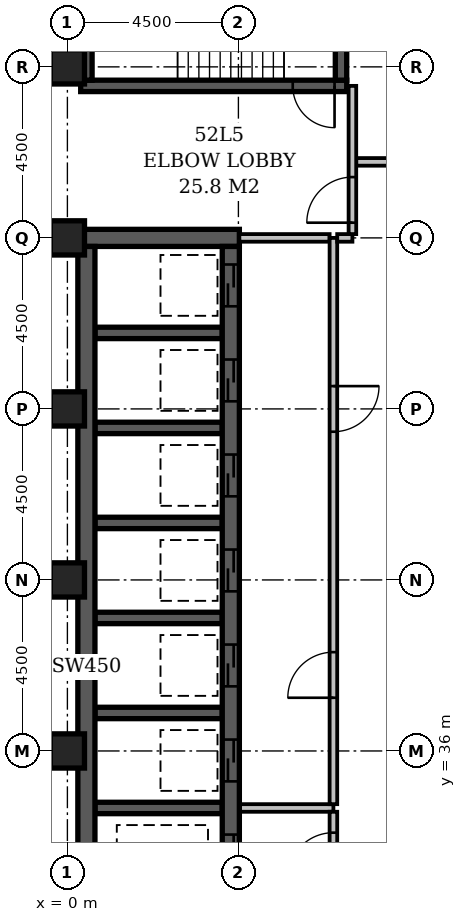
"""IFC4 building model, lengths in metres.
Left out: names, types, materials, properties, quantities, classifications, styles, units other than length and angle.
Written with IfcOpenShell. Run it as: python <this file> out.ifc"""

import sys

from ifc_helpers import new_model, si_unit, direction, frame, frame_2d, origin, origin_2d, place, context, subcontext, project, spatial, rectangle, extrude, element, fill, save


model = new_model("IFC4")
c1 = context("Model", 3, precision=1e-05, world=origin(), true_north=direction((0.0, 1.0)))
c2 = subcontext(c1, "Body", "Model", "MODEL_VIEW")
j1 = project(units=[si_unit("LENGTHUNIT", "METRE"), si_unit("PLANEANGLEUNIT", "RADIAN")], contexts=[c1])
p1 = place(None, origin())
s1 = spatial("IfcSite", under=j1, at=p1, CompositionType="ELEMENT")
p2 = place(p1, origin())
s2 = spatial("IfcBuilding", under=s1, at=p2, CompositionType="ELEMENT")
p3 = place(p2, frame((0.0, 0.0, 204.2)))
s3 = spatial("IfcBuildingStorey", under=s2, at=p3, CompositionType="ELEMENT", Elevation=204.2)
p4 = place(p3, frame((0.275, 49.5, -0.3), z_axis=(0.0, 0.0, 1.0), x_axis=(1.0, 0.0, 0.0)))
e1 = element("IfcWall", 1, at=p4, inside=s3, PredefinedType="SHEAR", context=c2, shape_type="SweptSolid", body=[
    extrude(rectangle(XDim=4.25, YDim=0.45, at=frame_2d((2.125, 0.0))), origin(), (0.0, 0.0, 1.0), 3.6),
])
p5 = place(p3, frame((0.35, 53.5, -0.3), z_axis=(0.0, 0.0, 1.0), x_axis=(1.0, 0.0, 0.0)))
e2 = element("IfcWall", 2, at=p5, inside=s3, PredefinedType="SHEAR", context=c2, shape_type="SweptSolid", body=[
    extrude(rectangle(XDim=7.0, YDim=0.3, at=frame_2d((3.5, 0.0))), origin(), (0.0, 0.0, 1.0), 3.6),
])
p6 = place(p5, frame((5.58, 0.0, 0.3)))
e3 = element("IfcOpeningElement", 3, at=p6, cuts=e2, PredefinedType="OPENING", context=c2, shape_type="SweptSolid", body=[
    extrude(rectangle(XDim=1.1, YDim=2.1, at=frame_2d((0.55, 1.05))), frame((0.0, 0.162, 0.0), z_axis=(0.0, -1.0, 0.0), x_axis=(1.0, 0.0, 0.0)), (0.0, 0.0, 1.0), 0.324),
])
p7 = place(p3, frame((0.5, 27.15, -0.3), z_axis=(0.0, 0.0, 1.0), x_axis=(0.0, 1.0, 0.0)))
e4 = element("IfcWall", 4, at=p7, inside=s3, PredefinedType="SHEAR", context=c2, shape_type="SweptSolid", body=[
    extrude(rectangle(XDim=22.125, YDim=0.45, at=frame_2d((11.062, 0.0))), origin(), (0.0, 0.0, 1.0), 3.6),
])
p8 = place(p3, frame((0.5, 53.65, -0.3), z_axis=(0.0, 0.0, 1.0), x_axis=(0.0, 1.0, 0.0)))
e5 = element("IfcWall", 5, at=p8, inside=s3, PredefinedType="SHEAR", context=c2, shape_type="SweptSolid", body=[
    extrude(rectangle(XDim=4.2, YDim=0.3, at=frame_2d((2.1, 0.0))), origin(), (0.0, 0.0, 1.0), 3.6),
])
for number, where, z_axis, x_axis in (
    (6, (0.725, 34.5, -0.3), (0.0, 0.0, 1.0), (1.0, 0.0, 0.0)),
    (7, (0.725, 37.0, -0.3), (0.0, 0.0, 1.0), (1.0, 0.0, 0.0)),
    (8, (0.725, 39.5, -0.3), (0.0, 0.0, 1.0), (1.0, 0.0, 0.0)),
    (9, (0.725, 42.0, -0.3), (0.0, 0.0, 1.0), (1.0, 0.0, 0.0)),
    (10, (0.725, 44.5, -0.3), (0.0, 0.0, 1.0), (1.0, 0.0, 0.0)),
    (11, (0.725, 47.0, -0.3), (0.0, 0.0, 1.0), (1.0, 0.0, 0.0)),
):
    element("IfcWall", number, at=place(p3, frame(where, z_axis=z_axis, x_axis=x_axis)), inside=s3, PredefinedType="SHEAR", context=c2, shape_type="SweptSolid", body=[
        extrude(rectangle(XDim=3.35, YDim=0.3, at=frame_2d((1.675, 0.0))), origin(), (0.0, 0.0, 1.0), 3.6),
    ])
p9 = place(p3, frame((4.3, 27.15, -0.3), z_axis=(0.0, 0.0, 1.0), x_axis=(0.0, 1.0, 0.0)))
e12 = element("IfcWall", 12, at=p9, inside=s3, PredefinedType="SHEAR", context=c2, shape_type="SweptSolid", body=[
    extrude(rectangle(XDim=22.125, YDim=0.45, at=frame_2d((11.062, 0.0))), origin(), (0.0, 0.0, 1.0), 3.6),
])
p10 = place(p9, frame((3.05, 0.0, 0.3)))
e13 = element("IfcOpeningElement", 13, at=p10, cuts=e12, PredefinedType="OPENING", context=c2, shape_type="SweptSolid", body=[
    extrude(rectangle(XDim=1.1, YDim=2.1, at=frame_2d((0.55, 1.05))), frame((0.0, 0.237, 0.0), z_axis=(0.0, -1.0, 0.0), x_axis=(1.0, 0.0, 0.0)), (0.0, 0.0, 1.0), 0.474),
])
p11 = place(p9, frame((0.55, 0.0, 0.3)))
e14 = element("IfcOpeningElement", 14, at=p11, cuts=e12, PredefinedType="OPENING", context=c2, shape_type="SweptSolid", body=[
    extrude(rectangle(XDim=1.1, YDim=2.1, at=frame_2d((0.55, 1.05))), frame((0.0, 0.237, 0.0), z_axis=(0.0, -1.0, 0.0), x_axis=(1.0, 0.0, 0.0)), (0.0, 0.0, 1.0), 0.474),
])
p12 = place(p9, frame((20.55, 0.0, 0.3)))
e15 = element("IfcOpeningElement", 15, at=p12, cuts=e12, PredefinedType="OPENING", context=c2, shape_type="SweptSolid", body=[
    extrude(rectangle(XDim=1.1, YDim=2.1, at=frame_2d((0.55, 1.05))), frame((0.0, 0.237, 0.0), z_axis=(0.0, -1.0, 0.0), x_axis=(1.0, 0.0, 0.0)), (0.0, 0.0, 1.0), 0.474),
])
p13 = place(p9, frame((18.05, 0.0, 0.3)))
e16 = element("IfcOpeningElement", 16, at=p13, cuts=e12, PredefinedType="OPENING", context=c2, shape_type="SweptSolid", body=[
    extrude(rectangle(XDim=1.1, YDim=2.1, at=frame_2d((0.55, 1.05))), frame((0.0, 0.237, 0.0), z_axis=(0.0, -1.0, 0.0), x_axis=(1.0, 0.0, 0.0)), (0.0, 0.0, 1.0), 0.474),
])
p14 = place(p9, frame((15.55, 0.0, 0.3)))
e17 = element("IfcOpeningElement", 17, at=p14, cuts=e12, PredefinedType="OPENING", context=c2, shape_type="SweptSolid", body=[
    extrude(rectangle(XDim=1.1, YDim=2.1, at=frame_2d((0.55, 1.05))), frame((0.0, 0.237, 0.0), z_axis=(0.0, -1.0, 0.0), x_axis=(1.0, 0.0, 0.0)), (0.0, 0.0, 1.0), 0.474),
])
p15 = place(p9, frame((13.05, 0.0, 0.3)))
e18 = element("IfcOpeningElement", 18, at=p15, cuts=e12, PredefinedType="OPENING", context=c2, shape_type="SweptSolid", body=[
    extrude(rectangle(XDim=1.1, YDim=2.1, at=frame_2d((0.55, 1.05))), frame((0.0, 0.237, 0.0), z_axis=(0.0, -1.0, 0.0), x_axis=(1.0, 0.0, 0.0)), (0.0, 0.0, 1.0), 0.474),
])
p16 = place(p9, frame((10.55, 0.0, 0.3)))
e19 = element("IfcOpeningElement", 19, at=p16, cuts=e12, PredefinedType="OPENING", context=c2, shape_type="SweptSolid", body=[
    extrude(rectangle(XDim=1.1, YDim=2.1, at=frame_2d((0.55, 1.05))), frame((0.0, 0.237, 0.0), z_axis=(0.0, -1.0, 0.0), x_axis=(1.0, 0.0, 0.0)), (0.0, 0.0, 1.0), 0.474),
])
p17 = place(p9, frame((8.05, 0.0, 0.3)))
e20 = element("IfcOpeningElement", 20, at=p17, cuts=e12, PredefinedType="OPENING", context=c2, shape_type="SweptSolid", body=[
    extrude(rectangle(XDim=1.1, YDim=2.1, at=frame_2d((0.55, 1.05))), frame((0.0, 0.237, 0.0), z_axis=(0.0, -1.0, 0.0), x_axis=(1.0, 0.0, 0.0)), (0.0, 0.0, 1.0), 0.474),
])
p18 = place(p9, frame((5.55, 0.0, 0.3)))
e21 = element("IfcOpeningElement", 21, at=p18, cuts=e12, PredefinedType="OPENING", context=c2, shape_type="SweptSolid", body=[
    extrude(rectangle(XDim=1.1, YDim=2.1, at=frame_2d((0.55, 1.05))), frame((0.0, 0.237, 0.0), z_axis=(0.0, -1.0, 0.0), x_axis=(1.0, 0.0, 0.0)), (0.0, 0.0, 1.0), 0.474),
])
p19 = place(p3, frame((7.2, 53.65, -0.3), z_axis=(0.0, 0.0, 1.0), x_axis=(0.0, 1.0, 0.0)))
e22 = element("IfcWall", 22, at=p19, inside=s3, PredefinedType="SHEAR", context=c2, shape_type="SweptSolid", body=[
    extrude(rectangle(XDim=4.2, YDim=0.3, at=frame_2d((2.1, 0.0))), origin(), (0.0, 0.0, 1.0), 3.6),
])
for number, where, z_axis, x_axis in (
    (23, (0.0, 36.0, -0.3), (0.0, 0.0, 1.0), (1.0, 0.0, 0.0)),
    (24, (0.0, 40.5, -0.3), (0.0, 0.0, 1.0), (1.0, 0.0, 0.0)),
    (25, (0.0, 45.0, -0.3), (0.0, 0.0, 1.0), (1.0, 0.0, 0.0)),
    (26, (0.0, 49.5, -0.3), (0.0, 0.0, 1.0), (1.0, 0.0, 0.0)),
    (27, (0.0, 54.0, -0.3), (0.0, 0.0, 1.0), (1.0, 0.0, 0.0)),
):
    element("IfcColumn", number, at=place(p3, frame(where, z_axis=z_axis, x_axis=x_axis)), inside=s3, PredefinedType="COLUMN", context=c2, shape_type="SweptSolid", body=[
        extrude(rectangle(XDim=0.9, YDim=0.9, at=origin_2d()), origin(), (0.0, 0.0, 1.0), 3.6),
    ])
p20 = place(p3, frame((4.545, 34.5, 0.0), z_axis=(0.0, 0.0, 1.0), x_axis=(1.0, 0.0, 0.0)))
e28 = element("IfcWall", 28, at=p20, inside=s3, PredefinedType="PARTITIONING", context=c2, shape_type="SweptSolid", body=[
    extrude(rectangle(XDim=2.455, YDim=0.2, at=frame_2d((1.228, 0.0))), origin(), (0.0, 0.0, 1.0), 3.3),
])
p21 = place(p3, frame((7.0, 34.6, 0.0), z_axis=(0.0, 0.0, 1.0), x_axis=(0.0, 1.0, 0.0)))
e29 = element("IfcWall", 29, at=p21, inside=s3, PredefinedType="PARTITIONING", context=c2, shape_type="SweptSolid", body=[
    extrude(rectangle(XDim=14.9, YDim=0.2, at=frame_2d((7.45, 0.0))), origin(), (0.0, 0.0, 1.0), 3.3),
])
p22 = place(p21, frame((2.8, 0.0, 0.0)))
e30 = element("IfcOpeningElement", 30, at=p22, cuts=e29, PredefinedType="OPENING", context=c2, shape_type="SweptSolid", body=[
    extrude(rectangle(XDim=1.2, YDim=2.1, at=frame_2d((0.6, 1.05))), frame((0.0, 0.112, 0.0), z_axis=(0.0, -1.0, 0.0), x_axis=(1.0, 0.0, 0.0)), (0.0, 0.0, 1.0), 0.224),
])
p23 = place(p21, frame((9.8, 0.0, 0.0)))
e31 = element("IfcOpeningElement", 31, at=p23, cuts=e29, PredefinedType="OPENING", context=c2, shape_type="SweptSolid", body=[
    extrude(rectangle(XDim=1.2, YDim=2.1, at=frame_2d((0.6, 1.05))), frame((0.0, 0.112, 0.0), z_axis=(0.0, -1.0, 0.0), x_axis=(1.0, 0.0, 0.0)), (0.0, 0.0, 1.0), 0.224),
])
p24 = place(p3, frame((4.525, 49.5, 0.0), z_axis=(0.0, 0.0, 1.0), x_axis=(1.0, 0.0, 0.0)))
e32 = element("IfcWall", 32, at=p24, inside=s3, PredefinedType="PARTITIONING", context=c2, shape_type="SweptSolid", body=[
    extrude(rectangle(XDim=2.375, YDim=0.2, at=frame_2d((1.188, 0.0))), origin(), (0.0, 0.0, 1.0), 3.3),
])
p25 = place(p3, frame((7.0, 32.1, 0.0), z_axis=(0.0, 0.0, 1.0), x_axis=(0.0, 1.0, 0.0)))
e33 = element("IfcWall", 33, at=p25, inside=s3, PredefinedType="PARTITIONING", context=c2, shape_type="SweptSolid", body=[
    extrude(rectangle(XDim=2.3, YDim=0.2, at=frame_2d((1.15, 0.0))), origin(), (0.0, 0.0, 1.0), 3.3),
])
p26 = place(p25, frame((0.55, 0.0, 0.0)))
e34 = element("IfcOpeningElement", 34, at=p26, cuts=e33, PredefinedType="OPENING", context=c2, shape_type="SweptSolid", body=[
    extrude(rectangle(XDim=1.2, YDim=2.1, at=frame_2d((0.6, 1.05))), frame((0.0, 0.112, 0.0), z_axis=(0.0, -1.0, 0.0), x_axis=(1.0, 0.0, 0.0)), (0.0, 0.0, 1.0), 0.224),
])
p27 = place(p3, frame((7.1, 49.5, 0.0), z_axis=(0.0, 0.0, 1.0), x_axis=(1.0, 0.0, 0.0)))
e35 = element("IfcWall", 35, at=p27, inside=s3, PredefinedType="PARTITIONING", context=c2, shape_type="SweptSolid", body=[
    extrude(rectangle(XDim=0.4, YDim=0.2, at=frame_2d((0.2, 0.0))), origin(), (0.0, 0.0, 1.0), 3.3),
])
p28 = place(p3, frame((7.5, 49.6, 0.0), z_axis=(0.0, 0.0, 1.0), x_axis=(0.0, 1.0, 0.0)))
e36 = element("IfcWall", 36, at=p28, inside=s3, PredefinedType="PARTITIONING", context=c2, shape_type="SweptSolid", body=[
    extrude(rectangle(XDim=3.9, YDim=0.2, at=frame_2d((1.95, 0.0))), origin(), (0.0, 0.0, 1.0), 3.3),
])
p29 = place(p28, frame((0.3, 0.0, 0.0)))
e37 = element("IfcOpeningElement", 37, at=p29, cuts=e36, PredefinedType="OPENING", context=c2, shape_type="SweptSolid", body=[
    extrude(rectangle(XDim=1.2, YDim=2.1, at=frame_2d((0.6, 1.05))), frame((0.0, 0.112, 0.0), z_axis=(0.0, -1.0, 0.0), x_axis=(1.0, 0.0, 0.0)), (0.0, 0.0, 1.0), 0.224),
])
p30 = place(p3, frame((7.6, 51.5, 0.0), z_axis=(0.0, 0.0, 1.0), x_axis=(1.0, 0.0, 0.0)))
e38 = element("IfcWall", 38, at=p30, inside=s3, PredefinedType="PARTITIONING", context=c2, shape_type="SweptSolid", body=[
    extrude(rectangle(XDim=15.3, YDim=0.2, at=frame_2d((7.65, 0.0))), origin(), (0.0, 0.0, 1.0), 3.3),
])
p31 = place(p30, frame((3.55, 0.0, 0.0)))
e39 = element("IfcOpeningElement", 39, at=p31, cuts=e38, PredefinedType="OPENING", context=c2, shape_type="SweptSolid", body=[
    extrude(rectangle(XDim=0.9, YDim=2.1, at=frame_2d((0.45, 1.05))), frame((0.0, 0.112, 0.0), z_axis=(0.0, -1.0, 0.0), x_axis=(1.0, 0.0, 0.0)), (0.0, 0.0, 1.0), 0.224),
])
p32 = place(p30, frame((11.3, 0.0, 0.0)))
e40 = element("IfcOpeningElement", 40, at=p32, cuts=e38, PredefinedType="OPENING", context=c2, shape_type="SweptSolid", body=[
    extrude(rectangle(XDim=0.9, YDim=2.1, at=frame_2d((0.45, 1.05))), frame((0.0, 0.112, 0.0), z_axis=(0.0, -1.0, 0.0), x_axis=(1.0, 0.0, 0.0)), (0.0, 0.0, 1.0), 0.224),
])
p33 = place(p29, origin())
e41 = element("IfcDoor", 41, at=p33, inside=s3, OperationType="SINGLE_SWING_LEFT", PredefinedType="DOOR", context=c2, shape_type="SweptSolid", body=[
    extrude(rectangle(XDim=1.2, YDim=2.1, at=frame_2d((0.6, 1.05))), frame((0.0, 0.025, 0.0), z_axis=(0.0, -1.0, 0.0), x_axis=(1.0, 0.0, 0.0)), (0.0, 0.0, 1.0), 0.05),
])
fill(e37, e41)
p34 = place(p12, origin())
e42 = element("IfcDoor", 42, at=p34, inside=s3, OperationType="SLIDING_TO_LEFT", PredefinedType="DOOR", context=c2, shape_type="SweptSolid", body=[
    extrude(rectangle(XDim=1.1, YDim=2.1, at=frame_2d((0.55, 1.05))), frame((0.0, 0.025, 0.0), z_axis=(0.0, -1.0, 0.0), x_axis=(1.0, 0.0, 0.0)), (0.0, 0.0, 1.0), 0.05),
])
fill(e15, e42)
p35 = place(p13, origin())
e43 = element("IfcDoor", 43, at=p35, inside=s3, OperationType="SLIDING_TO_LEFT", PredefinedType="DOOR", context=c2, shape_type="SweptSolid", body=[
    extrude(rectangle(XDim=1.1, YDim=2.1, at=frame_2d((0.55, 1.05))), frame((0.0, 0.025, 0.0), z_axis=(0.0, -1.0, 0.0), x_axis=(1.0, 0.0, 0.0)), (0.0, 0.0, 1.0), 0.05),
])
fill(e16, e43)
p36 = place(p14, origin())
e44 = element("IfcDoor", 44, at=p36, inside=s3, OperationType="SLIDING_TO_LEFT", PredefinedType="DOOR", context=c2, shape_type="SweptSolid", body=[
    extrude(rectangle(XDim=1.1, YDim=2.1, at=frame_2d((0.55, 1.05))), frame((0.0, 0.025, 0.0), z_axis=(0.0, -1.0, 0.0), x_axis=(1.0, 0.0, 0.0)), (0.0, 0.0, 1.0), 0.05),
])
fill(e17, e44)
p37 = place(p15, origin())
e45 = element("IfcDoor", 45, at=p37, inside=s3, OperationType="SLIDING_TO_LEFT", PredefinedType="DOOR", context=c2, shape_type="SweptSolid", body=[
    extrude(rectangle(XDim=1.1, YDim=2.1, at=frame_2d((0.55, 1.05))), frame((0.0, 0.025, 0.0), z_axis=(0.0, -1.0, 0.0), x_axis=(1.0, 0.0, 0.0)), (0.0, 0.0, 1.0), 0.05),
])
fill(e18, e45)
p38 = place(p16, origin())
e46 = element("IfcDoor", 46, at=p38, inside=s3, OperationType="SLIDING_TO_LEFT", PredefinedType="DOOR", context=c2, shape_type="SweptSolid", body=[
    extrude(rectangle(XDim=1.1, YDim=2.1, at=frame_2d((0.55, 1.05))), frame((0.0, 0.025, 0.0), z_axis=(0.0, -1.0, 0.0), x_axis=(1.0, 0.0, 0.0)), (0.0, 0.0, 1.0), 0.05),
])
fill(e19, e46)
p39 = place(p17, origin())
e47 = element("IfcDoor", 47, at=p39, inside=s3, OperationType="SLIDING_TO_LEFT", PredefinedType="DOOR", context=c2, shape_type="SweptSolid", body=[
    extrude(rectangle(XDim=1.1, YDim=2.1, at=frame_2d((0.55, 1.05))), frame((0.0, 0.025, 0.0), z_axis=(0.0, -1.0, 0.0), x_axis=(1.0, 0.0, 0.0)), (0.0, 0.0, 1.0), 0.05),
])
fill(e20, e47)
p40 = place(p22, origin())
e48 = element("IfcDoor", 48, at=p40, inside=s3, OperationType="SINGLE_SWING_LEFT", PredefinedType="DOOR", context=c2, shape_type="SweptSolid", body=[
    extrude(rectangle(XDim=1.2, YDim=2.1, at=frame_2d((0.6, 1.05))), frame((0.0, 0.025, 0.0), z_axis=(0.0, -1.0, 0.0), x_axis=(1.0, 0.0, 0.0)), (0.0, 0.0, 1.0), 0.05),
])
fill(e30, e48)
p41 = place(p23, origin())
e49 = element("IfcDoor", 49, at=p41, inside=s3, OperationType="SINGLE_SWING_RIGHT", PredefinedType="DOOR", context=c2, shape_type="SweptSolid", body=[
    extrude(rectangle(XDim=1.2, YDim=2.1, at=frame_2d((0.6, 1.05))), frame((0.0, 0.025, 0.0), z_axis=(0.0, -1.0, 0.0), x_axis=(1.0, 0.0, 0.0)), (0.0, 0.0, 1.0), 0.05),
])
fill(e31, e49)
p42 = place(p26, origin())
e50 = element("IfcDoor", 50, at=p42, inside=s3, OperationType="SINGLE_SWING_LEFT", PredefinedType="DOOR", context=c2, shape_type="SweptSolid", body=[
    extrude(rectangle(XDim=1.2, YDim=2.1, at=frame_2d((0.6, 1.05))), frame((0.0, 0.025, 0.0), z_axis=(0.0, -1.0, 0.0), x_axis=(1.0, 0.0, 0.0)), (0.0, 0.0, 1.0), 0.05),
])
fill(e34, e50)
p43 = place(p18, origin())
e51 = element("IfcDoor", 51, at=p43, inside=s3, OperationType="SLIDING_TO_LEFT", PredefinedType="DOOR", context=c2, shape_type="SweptSolid", body=[
    extrude(rectangle(XDim=1.1, YDim=2.1, at=frame_2d((0.55, 1.05))), frame((0.0, 0.025, 0.0), z_axis=(0.0, -1.0, 0.0), x_axis=(1.0, 0.0, 0.0)), (0.0, 0.0, 1.0), 0.05),
])
fill(e21, e51)
p44 = place(p6, origin())
e52 = element("IfcDoor", 52, at=p44, inside=s3, OperationType="SINGLE_SWING_RIGHT", PredefinedType="DOOR", context=c2, shape_type="SweptSolid", body=[
    extrude(rectangle(XDim=1.1, YDim=2.1, at=frame_2d((0.55, 1.05))), frame((0.0, 0.025, 0.0), z_axis=(0.0, -1.0, 0.0), x_axis=(1.0, 0.0, 0.0)), (0.0, 0.0, 1.0), 0.05),
])
fill(e3, e52)
save(model, sys.argv[1])
